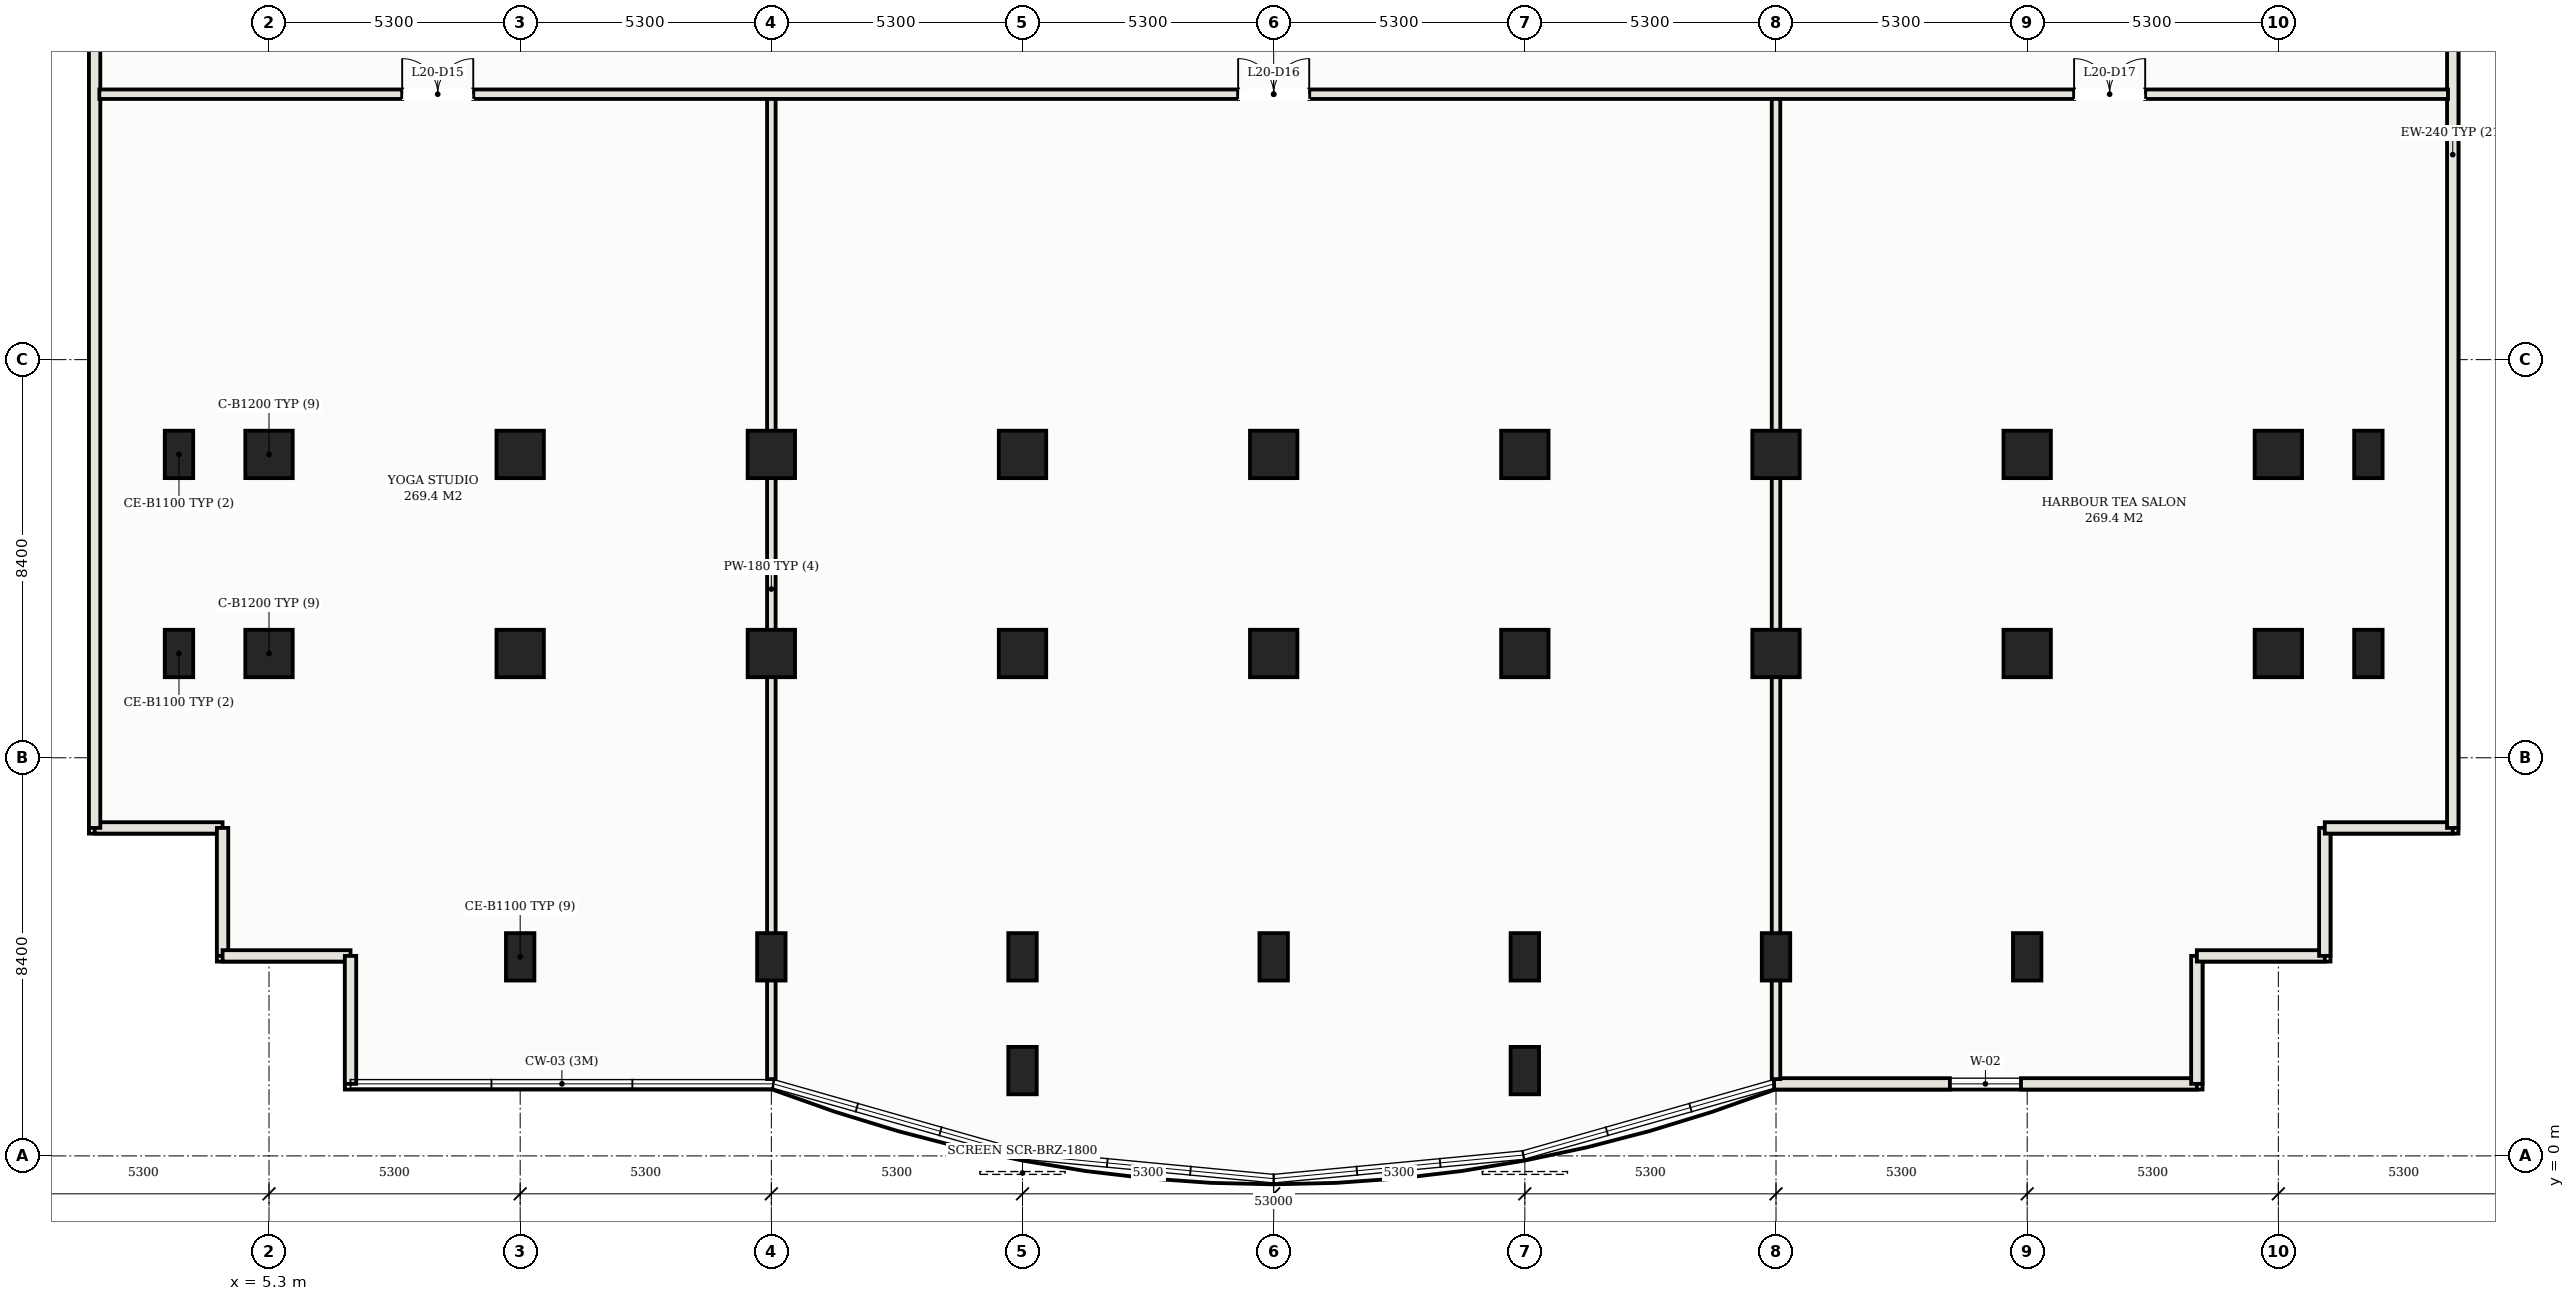
"""IFC4 building model, lengths in metres.
Left out: names, types, materials, properties, quantities, classifications, styles, units other than length and angle.
Written with IfcOpenShell. Run it as: python <this file> out.ifc"""

import sys

from ifc_helpers import new_model, si_unit, direction, frame, frame_2d, origin, origin_2d, place, context, subcontext, project, spatial, rectangle, hollow_rectangle, extrude, element, fill, save


model = new_model("IFC4")
c1 = context("Model", 3, precision=1e-05, world=origin(), true_north=direction((0.0, 1.0)))
c2 = subcontext(c1, "Body", "Model", "MODEL_VIEW")
j1 = project(units=[si_unit("LENGTHUNIT", "METRE"), si_unit("PLANEANGLEUNIT", "RADIAN")], contexts=[c1])
p1 = place(None, origin())
s1 = spatial("IfcSite", under=j1, at=p1, CompositionType="ELEMENT")
p2 = place(p1, origin())
s2 = spatial("IfcBuilding", under=s1, at=p2, CompositionType="ELEMENT")
p3 = place(p2, frame((0.0, 0.0, 77.2)))
s3 = spatial("IfcBuildingStorey", under=s2, at=p3, CompositionType="ELEMENT", Elevation=77.2)
for number, where, z_axis, x_axis in (
    (1, (10.6, 14.8, 0.0), (0.0, 0.0, 1.0), (1.0, 0.0, 0.0)),
    (2, (10.6, 10.6, 0.0), (0.0, 0.0, 1.0), (1.0, 0.0, 0.0)),
    (3, (15.9, 14.8, 0.0), (0.0, 0.0, 1.0), (1.0, 0.0, 0.0)),
    (4, (15.9, 10.6, 0.0), (0.0, 0.0, 1.0), (1.0, 0.0, 0.0)),
    (5, (21.2, 14.8, 0.0), (0.0, 0.0, 1.0), (1.0, 0.0, 0.0)),
    (6, (21.2, 10.6, 0.0), (0.0, 0.0, 1.0), (1.0, 0.0, 0.0)),
    (7, (26.5, 14.8, 0.0), (0.0, 0.0, 1.0), (1.0, 0.0, 0.0)),
    (8, (26.5, 10.6, 0.0), (0.0, 0.0, 1.0), (1.0, 0.0, 0.0)),
    (9, (31.8, 14.8, 0.0), (0.0, 0.0, 1.0), (1.0, 0.0, 0.0)),
    (10, (31.8, 10.6, 0.0), (0.0, 0.0, 1.0), (1.0, 0.0, 0.0)),
    (11, (37.1, 14.8, 0.0), (0.0, 0.0, 1.0), (1.0, 0.0, 0.0)),
    (12, (37.1, 10.6, 0.0), (0.0, 0.0, 1.0), (1.0, 0.0, 0.0)),
    (13, (42.4, 14.8, 0.0), (0.0, 0.0, 1.0), (1.0, 0.0, 0.0)),
    (14, (42.4, 10.6, 0.0), (0.0, 0.0, 1.0), (1.0, 0.0, 0.0)),
):
    element("IfcColumn", number, at=place(p3, frame(where, z_axis=z_axis, x_axis=x_axis)), inside=s3, PredefinedType="COLUMN", context=c2, shape_type="SweptSolid", body=[
        extrude(hollow_rectangle(XDim=1.0, YDim=1.0, WallThickness=0.036, at=origin_2d()), origin(), (0.0, 0.0, 1.0), 4.5),
    ])
for number, where, z_axis, x_axis in (
    (15, (21.2, 1.8, 0.0), (0.0, 0.0, 1.0), (1.0, 0.0, 0.0)),
    (16, (31.8, 1.8, 0.0), (0.0, 0.0, 1.0), (1.0, 0.0, 0.0)),
    (17, (10.6, 4.2, 0.0), (0.0, 0.0, 1.0), (1.0, 0.0, 0.0)),
    (18, (15.9, 4.2, 0.0), (0.0, 0.0, 1.0), (1.0, 0.0, 0.0)),
    (19, (21.2, 4.2, 0.0), (0.0, 0.0, 1.0), (1.0, 0.0, 0.0)),
    (20, (26.5, 4.2, 0.0), (0.0, 0.0, 1.0), (1.0, 0.0, 0.0)),
    (21, (31.8, 4.2, 0.0), (0.0, 0.0, 1.0), (1.0, 0.0, 0.0)),
    (22, (37.1, 4.2, 0.0), (0.0, 0.0, 1.0), (1.0, 0.0, 0.0)),
    (23, (42.4, 4.2, 0.0), (0.0, 0.0, 1.0), (1.0, 0.0, 0.0)),
    (24, (3.4, 10.6, 0.0), (0.0, 0.0, 1.0), (1.0, 0.0, 0.0)),
    (25, (3.4, 14.8, 0.0), (0.0, 0.0, 1.0), (1.0, 0.0, 0.0)),
):
    element("IfcColumn", number, at=place(p3, frame(where, z_axis=z_axis, x_axis=x_axis)), inside=s3, PredefinedType="COLUMN", context=c2, shape_type="SweptSolid", body=[
        extrude(hollow_rectangle(XDim=0.6, YDim=1.0, WallThickness=0.032, at=origin_2d()), origin(), (0.0, 0.0, 1.0), 4.5),
    ])
for number, where, z_axis, x_axis in (
    (26, (5.3, 10.6, 0.0), (0.0, 0.0, 1.0), (1.0, 0.0, 0.0)),
    (27, (5.3, 14.8, 0.0), (0.0, 0.0, 1.0), (1.0, 0.0, 0.0)),
    (28, (47.7, 10.6, 0.0), (0.0, 0.0, 1.0), (1.0, 0.0, 0.0)),
    (29, (47.7, 14.8, 0.0), (0.0, 0.0, 1.0), (1.0, 0.0, 0.0)),
):
    element("IfcColumn", number, at=place(p3, frame(where, z_axis=z_axis, x_axis=x_axis)), inside=s3, PredefinedType="COLUMN", context=c2, shape_type="SweptSolid", body=[
        extrude(hollow_rectangle(XDim=1.0, YDim=1.0, WallThickness=0.036, at=origin_2d()), origin(), (0.0, 0.0, 1.0), 4.5),
    ])
for number, where, z_axis, x_axis in (
    (30, (49.6, 10.6, 0.0), (0.0, 0.0, 1.0), (1.0, 0.0, 0.0)),
    (31, (49.6, 14.8, 0.0), (0.0, 0.0, 1.0), (1.0, 0.0, 0.0)),
):
    element("IfcColumn", number, at=place(p3, frame(where, z_axis=z_axis, x_axis=x_axis)), inside=s3, PredefinedType="COLUMN", context=c2, shape_type="SweptSolid", body=[
        extrude(hollow_rectangle(XDim=0.6, YDim=1.0, WallThickness=0.032, at=origin_2d()), origin(), (0.0, 0.0, 1.0), 4.5),
    ])
for number, where, z_axis, x_axis in (
    (32, (1.62, 6.92, 0.0), (0.0, 0.0, 1.0), (1.0, 0.0, 0.0)),
    (33, (4.32, 6.92, 0.0), (0.0, 0.0, 1.0), (0.0, -1.0, 0.0)),
    (34, (4.32, 4.22, 0.0), (0.0, 0.0, 1.0), (1.0, 0.0, 0.0)),
    (35, (7.02, 4.22, 0.0), (0.0, 0.0, 1.0), (0.0, -1.0, 0.0)),
):
    element("IfcWall", number, at=place(p3, frame(where, z_axis=z_axis, x_axis=x_axis)), inside=s3, PredefinedType="SOLIDWALL", context=c2, shape_type="SweptSolid", body=[
        extrude(rectangle(XDim=2.7, YDim=0.24, at=frame_2d((1.35, 0.0))), origin(), (0.0, 0.0, 1.0), 4.29),
    ])
p4 = place(p3, frame((37.059, 1.52, 0.0), z_axis=(0.0, 0.0, 1.0), x_axis=(1.0, 0.0, 0.0)))
e36 = element("IfcWall", 36, at=p4, inside=s3, PredefinedType="SOLIDWALL", context=c2, shape_type="SweptSolid", body=[
    extrude(rectangle(XDim=8.921, YDim=0.24, at=frame_2d((4.46, 0.0))), origin(), (0.0, 0.0, 1.0), 4.29),
])
p5 = place(p4, frame((3.71, 0.0, 0.75)))
e37 = element("IfcOpeningElement", 37, at=p5, cuts=e36, PredefinedType="OPENING", context=c2, shape_type="SweptSolid", body=[
    extrude(rectangle(XDim=1.5, YDim=1.6, at=frame_2d((0.75, 0.8))), frame((0.0, 0.13, 0.0), z_axis=(0.0, -1.0, 0.0), x_axis=(1.0, 0.0, 0.0)), (0.0, 0.0, 1.0), 0.26),
])
for number, where, z_axis, x_axis in (
    (38, (45.98, 1.52, 0.0), (0.0, 0.0, 1.0), (0.0, 1.0, 0.0)),
    (39, (45.98, 4.22, 0.0), (0.0, 0.0, 1.0), (1.0, 0.0, 0.0)),
    (40, (48.68, 4.22, 0.0), (0.0, 0.0, 1.0), (0.0, 1.0, 0.0)),
    (41, (48.68, 6.92, 0.0), (0.0, 0.0, 1.0), (1.0, 0.0, 0.0)),
):
    element("IfcWall", number, at=place(p3, frame(where, z_axis=z_axis, x_axis=x_axis)), inside=s3, PredefinedType="SOLIDWALL", context=c2, shape_type="SweptSolid", body=[
        extrude(rectangle(XDim=2.7, YDim=0.24, at=frame_2d((1.35, 0.0))), origin(), (0.0, 0.0, 1.0), 4.29),
    ])
for number, where, z_axis, x_axis in (
    (42, (51.38, 6.92, 0.0), (0.0, 0.0, 1.0), (0.0, 1.0, 0.0)),
    (43, (1.62, 35.33, 0.0), (0.0, 0.0, 1.0), (0.0, -1.0, 0.0)),
):
    element("IfcWall", number, at=place(p3, frame(where, z_axis=z_axis, x_axis=x_axis)), inside=s3, PredefinedType="SOLIDWALL", context=c2, shape_type="SweptSolid", body=[
        extrude(rectangle(XDim=28.41, YDim=0.24, at=frame_2d((14.205, 0.0))), origin(), (0.0, 0.0, 1.0), 4.29),
    ])
p6 = place(p3, frame((1.72, 22.4, 0.0), z_axis=(0.0, 0.0, 1.0), x_axis=(1.0, 0.0, 0.0)))
e44 = element("IfcWall", 44, at=p6, inside=s3, PredefinedType="PARTITIONING", context=c2, shape_type="SweptSolid", body=[
    extrude(rectangle(XDim=49.56, YDim=0.2, at=frame_2d((24.78, 0.0))), origin(), (0.0, 0.0, 1.0), 4.29),
])
p7 = place(p6, frame((6.39, 0.0, 0.0)))
e45 = element("IfcOpeningElement", 45, at=p7, cuts=e44, PredefinedType="OPENING", context=c2, shape_type="SweptSolid", body=[
    extrude(rectangle(XDim=1.5, YDim=2.25, at=frame_2d((0.75, 1.125))), frame((0.0, 0.11, 0.0), z_axis=(0.0, -1.0, 0.0), x_axis=(1.0, 0.0, 0.0)), (0.0, 0.0, 1.0), 0.22),
])
p8 = place(p6, frame((24.03, 0.0, 0.0)))
e46 = element("IfcOpeningElement", 46, at=p8, cuts=e44, PredefinedType="OPENING", context=c2, shape_type="SweptSolid", body=[
    extrude(rectangle(XDim=1.5, YDim=2.25, at=frame_2d((0.75, 1.125))), frame((0.0, 0.11, 0.0), z_axis=(0.0, -1.0, 0.0), x_axis=(1.0, 0.0, 0.0)), (0.0, 0.0, 1.0), 0.22),
])
p9 = place(p6, frame((41.67, 0.0, 0.0)))
e47 = element("IfcOpeningElement", 47, at=p9, cuts=e44, PredefinedType="OPENING", context=c2, shape_type="SweptSolid", body=[
    extrude(rectangle(XDim=1.5, YDim=2.25, at=frame_2d((0.75, 1.125))), frame((0.0, 0.11, 0.0), z_axis=(0.0, -1.0, 0.0), x_axis=(1.0, 0.0, 0.0)), (0.0, 0.0, 1.0), 0.22),
])
for number, where, z_axis, x_axis in (
    (48, (15.9, 1.62, 0.0), (0.0, 0.0, 1.0), (0.0, 1.0, 0.0)),
    (49, (37.1, 1.62, 0.0), (0.0, 0.0, 1.0), (0.0, 1.0, 0.0)),
):
    element("IfcWall", number, at=place(p3, frame(where, z_axis=z_axis, x_axis=x_axis)), inside=s3, PredefinedType="PARTITIONING", context=c2, shape_type="SweptSolid", body=[
        extrude(rectangle(XDim=20.68, YDim=0.18, at=frame_2d((10.34, 0.0))), origin(), (0.0, 0.0, 1.0), 3.535),
    ])
p10 = place(p5, origin())
e50 = element("IfcWindow", 50, at=p10, inside=s3, PartitioningType="SINGLE_PANEL", PredefinedType="WINDOW", context=c2, shape_type="SweptSolid", body=[
    extrude(rectangle(XDim=1.5, YDim=1.6, at=frame_2d((0.75, 0.8))), frame((0.0, 0.03, 0.0), z_axis=(0.0, -1.0, 0.0), x_axis=(1.0, 0.0, 0.0)), (0.0, 0.0, 1.0), 0.06),
])
fill(e37, e50)
p11 = place(p7, origin())
e51 = element("IfcDoor", 51, at=p11, inside=s3, OperationType="DOUBLE_DOOR_SINGLE_SWING", PredefinedType="DOOR", context=c2, shape_type="SweptSolid", body=[
    extrude(rectangle(XDim=1.5, YDim=2.25, at=frame_2d((0.75, 1.125))), frame((0.0, 0.025, 0.0), z_axis=(0.0, -1.0, 0.0), x_axis=(1.0, 0.0, 0.0)), (0.0, 0.0, 1.0), 0.05),
])
fill(e45, e51)
p12 = place(p8, origin())
e52 = element("IfcDoor", 52, at=p12, inside=s3, OperationType="DOUBLE_DOOR_SINGLE_SWING", PredefinedType="DOOR", context=c2, shape_type="SweptSolid", body=[
    extrude(rectangle(XDim=1.5, YDim=2.25, at=frame_2d((0.75, 1.125))), frame((0.0, 0.025, 0.0), z_axis=(0.0, -1.0, 0.0), x_axis=(1.0, 0.0, 0.0)), (0.0, 0.0, 1.0), 0.05),
])
fill(e46, e52)
p13 = place(p9, origin())
e53 = element("IfcDoor", 53, at=p13, inside=s3, OperationType="DOUBLE_DOOR_SINGLE_SWING", PredefinedType="DOOR", context=c2, shape_type="SweptSolid", body=[
    extrude(rectangle(XDim=1.5, YDim=2.25, at=frame_2d((0.75, 1.125))), frame((0.0, 0.025, 0.0), z_axis=(0.0, -1.0, 0.0), x_axis=(1.0, 0.0, 0.0)), (0.0, 0.0, 1.0), 0.05),
])
fill(e47, e53)
save(model, sys.argv[1])
